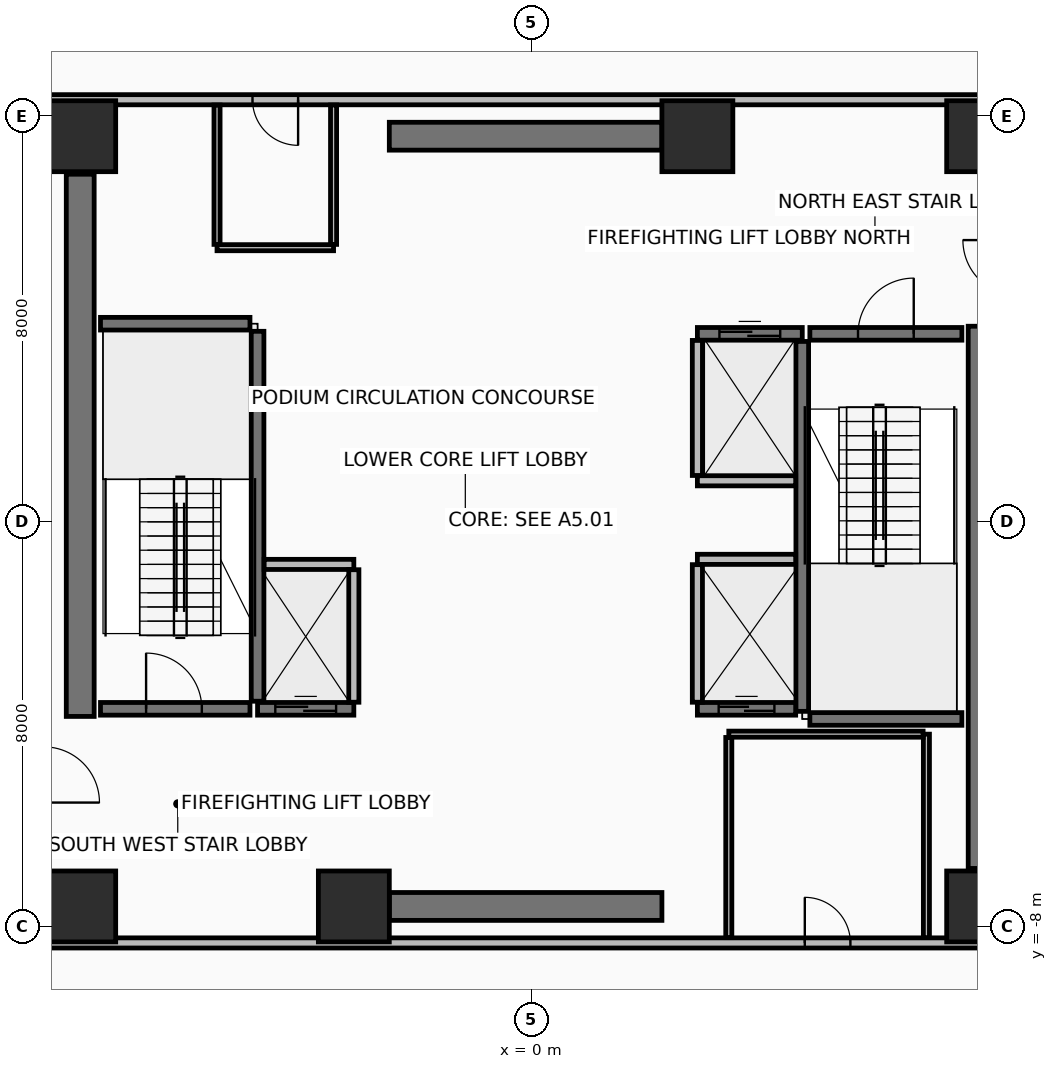
"""IFC4 building model, lengths in metres.
Left out: names, types, materials, properties, quantities, classifications, styles, units other than length and angle.
Written with IfcOpenShell. Run it as: python <this file> out.ifc"""

import sys

from ifc_helpers import new_model, si_unit, direction, frame, frame_2d, origin, origin_2d, place, context, subcontext, project, spatial, rectangle, extrude, element, fill, save


model = new_model("IFC4")
c1 = context("Model", 3, precision=1e-05, world=origin(), true_north=direction((0.0, 1.0)))
c2 = subcontext(c1, "Body", "Model", "MODEL_VIEW")
j1 = project(units=[si_unit("LENGTHUNIT", "METRE"), si_unit("PLANEANGLEUNIT", "RADIAN")], contexts=[c1])
p1 = place(None, origin())
s1 = spatial("IfcSite", under=j1, at=p1, CompositionType="ELEMENT")
p2 = place(p1, origin())
s2 = spatial("IfcBuilding", under=s1, at=p2, CompositionType="ELEMENT")
p3 = place(p2, frame((0.0, 0.0, -4.5)))
s3 = spatial("IfcBuildingStorey", under=s2, at=p3, CompositionType="ELEMENT", Elevation=-4.5)
for number, where, z_axis, x_axis in (
    (1, (-8.9, -7.6, 0.0), (0.0, 0.0, 1.0), (1.0, 0.0, 0.0)),
    (2, (-3.5, -7.6, 0.0), (0.0, 0.0, 1.0), (1.0, 0.0, 0.0)),
    (3, (8.9, -7.6, 0.0), (0.0, 0.0, 1.0), (1.0, 0.0, 0.0)),
    (4, (8.9, 7.6, 0.0), (0.0, 0.0, 1.0), (1.0, 0.0, 0.0)),
    (5, (3.28, 7.6, 0.0), (0.0, 0.0, 1.0), (1.0, 0.0, 0.0)),
    (6, (-8.9, 7.6, 0.0), (0.0, 0.0, 1.0), (1.0, 0.0, 0.0)),
):
    element("IfcColumn", number, at=place(p3, frame(where, z_axis=z_axis, x_axis=x_axis)), inside=s3, PredefinedType="COLUMN", context=c2, shape_type="SweptSolid", body=[
        extrude(rectangle(XDim=1.4, YDim=1.4, at=origin_2d()), origin(), (0.0, 0.0, 1.0), 4.5),
    ])
for number, where, z_axis, x_axis in (
    (7, (-2.8, -7.6, 0.0), (0.0, 0.0, 1.0), (1.0, 0.0, 0.0)),
    (8, (-2.8, 7.6, 0.0), (0.0, 0.0, 1.0), (1.0, 0.0, 0.0)),
):
    element("IfcWall", number, at=place(p3, frame(where, z_axis=z_axis, x_axis=x_axis)), inside=s3, PredefinedType="SHEAR", context=c2, shape_type="SweptSolid", body=[
        extrude(rectangle(XDim=5.38, YDim=0.55, at=frame_2d((2.69, 0.0))), origin(), (0.0, 0.0, 1.0), 4.2),
    ])
for number, where, z_axis, x_axis in (
    (9, (-8.9, -3.85, 0.0), (0.0, 0.0, 1.0), (0.0, 1.0, 0.0)),
    (10, (8.9, -6.85, 0.0), (0.0, 0.0, 1.0), (0.0, 1.0, 0.0)),
):
    element("IfcWall", number, at=place(p3, frame(where, z_axis=z_axis, x_axis=x_axis)), inside=s3, PredefinedType="SHEAR", context=c2, shape_type="SweptSolid", body=[
        extrude(rectangle(XDim=10.7, YDim=0.55, at=frame_2d((5.35, 0.0))), origin(), (0.0, 0.0, 1.0), 4.2),
    ])
p4 = place(p3, frame((-9.62, -8.32, 0.0), z_axis=(0.0, 0.0, 1.0), x_axis=(1.0, 0.0, 0.0)))
e11 = element("IfcWall", 11, at=p4, inside=s3, PredefinedType="PARTITIONING", context=c2, shape_type="SweptSolid", body=[
    extrude(rectangle(XDim=19.24, YDim=0.2, at=frame_2d((9.62, 0.0))), origin(), (0.0, 0.0, 1.0), 3.545),
])
p5 = place(p4, frame((15.02, 0.0, 0.0)))
e12 = element("IfcOpeningElement", 12, at=p5, cuts=e11, PredefinedType="OPENING", context=c2, shape_type="SweptSolid", body=[
    extrude(rectangle(XDim=0.9, YDim=2.1, at=frame_2d((0.45, 1.05))), frame((0.0, 0.11, 0.0), z_axis=(0.0, -1.0, 0.0), x_axis=(1.0, 0.0, 0.0)), (0.0, 0.0, 1.0), 0.22),
])
p6 = place(p3, frame((9.62, 8.32, 0.0), z_axis=(0.0, 0.0, 1.0), x_axis=(-1.0, 0.0, 0.0)))
e13 = element("IfcWall", 13, at=p6, inside=s3, PredefinedType="PARTITIONING", context=c2, shape_type="SweptSolid", body=[
    extrude(rectangle(XDim=19.24, YDim=0.2, at=frame_2d((9.62, 0.0))), origin(), (0.0, 0.0, 1.0), 3.545),
])
p7 = place(p6, frame((14.22, 0.0, 0.0)))
e14 = element("IfcOpeningElement", 14, at=p7, cuts=e13, PredefinedType="OPENING", context=c2, shape_type="SweptSolid", body=[
    extrude(rectangle(XDim=0.9, YDim=2.1, at=frame_2d((0.45, 1.05))), frame((0.0, 0.11, 0.0), z_axis=(0.0, -1.0, 0.0), x_axis=(1.0, 0.0, 0.0)), (0.0, 0.0, 1.0), 0.22),
])
p8 = place(p3, frame((-5.4, -3.55, 0.0), z_axis=(0.0, 0.0, 1.0), x_axis=(0.0, 1.0, 0.0)))
e15 = element("IfcWall", 15, at=p8, inside=s3, PredefinedType="SHEAR", context=c2, shape_type="SweptSolid", body=[
    extrude(rectangle(XDim=7.3, YDim=0.25, at=frame_2d((3.65, 0.0))), origin(), (0.0, 0.0, 1.0), 4.2),
])
p9 = place(p3, frame((-8.5, -3.7, 0.0), z_axis=(0.0, 0.0, 1.0), x_axis=(1.0, 0.0, 0.0)))
e16 = element("IfcWall", 16, at=p9, inside=s3, PredefinedType="SHEAR", context=c2, shape_type="SweptSolid", body=[
    extrude(rectangle(XDim=2.95, YDim=0.25, at=frame_2d((1.475, 0.0))), origin(), (0.0, 0.0, 1.0), 4.2),
])
p10 = place(p9, frame((0.9, 0.0, 0.0)))
e17 = element("IfcOpeningElement", 17, at=p10, cuts=e16, PredefinedType="OPENING", context=c2, shape_type="SweptSolid", body=[
    extrude(rectangle(XDim=1.1, YDim=2.15, at=frame_2d((0.55, 1.075))), frame((0.0, 0.135, 0.0), z_axis=(0.0, -1.0, 0.0), x_axis=(1.0, 0.0, 0.0)), (0.0, 0.0, 1.0), 0.27),
])
p11 = place(p3, frame((-8.5, 3.9, 0.0), z_axis=(0.0, 0.0, 1.0), x_axis=(1.0, 0.0, 0.0)))
e18 = element("IfcWall", 18, at=p11, inside=s3, PredefinedType="SHEAR", context=c2, shape_type="SweptSolid", body=[
    extrude(rectangle(XDim=2.95, YDim=0.25, at=frame_2d((1.475, 0.0))), origin(), (0.0, 0.0, 1.0), 4.2),
])
p12 = place(p3, frame((5.35, -3.75, 0.0), z_axis=(0.0, 0.0, 1.0), x_axis=(0.0, 1.0, 0.0)))
e19 = element("IfcWall", 19, at=p12, inside=s3, PredefinedType="SHEAR", context=c2, shape_type="SweptSolid", body=[
    extrude(rectangle(XDim=7.3, YDim=0.25, at=frame_2d((3.65, 0.0))), origin(), (0.0, 0.0, 1.0), 4.2),
])
p13 = place(p3, frame((5.5, 3.7, 0.0), z_axis=(0.0, 0.0, 1.0), x_axis=(1.0, 0.0, 0.0)))
e20 = element("IfcWall", 20, at=p13, inside=s3, PredefinedType="SHEAR", context=c2, shape_type="SweptSolid", body=[
    extrude(rectangle(XDim=3.0, YDim=0.25, at=frame_2d((1.5, 0.0))), origin(), (0.0, 0.0, 1.0), 4.2),
])
p14 = place(p13, frame((0.95, 0.0, 0.0)))
e21 = element("IfcOpeningElement", 21, at=p14, cuts=e20, PredefinedType="OPENING", context=c2, shape_type="SweptSolid", body=[
    extrude(rectangle(XDim=1.1, YDim=2.15, at=frame_2d((0.55, 1.075))), frame((0.0, 0.135, 0.0), z_axis=(0.0, -1.0, 0.0), x_axis=(1.0, 0.0, 0.0)), (0.0, 0.0, 1.0), 0.27),
])
p15 = place(p3, frame((5.5, -3.9, 0.0), z_axis=(0.0, 0.0, 1.0), x_axis=(1.0, 0.0, 0.0)))
e22 = element("IfcWall", 22, at=p15, inside=s3, PredefinedType="SHEAR", context=c2, shape_type="SweptSolid", body=[
    extrude(rectangle(XDim=3.0, YDim=0.25, at=frame_2d((1.5, 0.0))), origin(), (0.0, 0.0, 1.0), 4.2),
])
p16 = place(p3, frame((-5.4, -3.7, 0.0), z_axis=(0.0, 0.0, 1.0), x_axis=(1.0, 0.0, 0.0)))
e23 = element("IfcWall", 23, at=p16, inside=s3, PredefinedType="SHEAR", context=c2, shape_type="SweptSolid", body=[
    extrude(rectangle(XDim=1.9, YDim=0.25, at=frame_2d((0.95, 0.0))), origin(), (0.0, 0.0, 1.0), 4.2),
])
p17 = place(p16, frame((0.35, 0.0, 0.0)))
e24 = element("IfcOpeningElement", 24, at=p17, cuts=e23, PredefinedType="OPENING", context=c2, shape_type="SweptSolid", body=[
    extrude(rectangle(XDim=1.2, YDim=2.2, at=frame_2d((0.6, 1.1))), frame((0.0, 0.135, 0.0), z_axis=(0.0, -1.0, 0.0), x_axis=(1.0, 0.0, 0.0)), (0.0, 0.0, 1.0), 0.27),
])
p18 = place(p3, frame((-5.27, -0.85, 0.0), z_axis=(0.0, 0.0, 1.0), x_axis=(1.0, 0.0, 0.0)))
e25 = element("IfcWall", 25, at=p18, inside=s3, PredefinedType="PARTITIONING", context=c2, shape_type="SweptSolid", body=[
    extrude(rectangle(XDim=1.77, YDim=0.2, at=frame_2d((0.885, 0.0))), origin(), (0.0, 0.0, 1.0), 4.2),
])
p19 = place(p3, frame((-3.5, -3.57, 0.0), z_axis=(0.0, 0.0, 1.0), x_axis=(0.0, 1.0, 0.0)))
e26 = element("IfcWall", 26, at=p19, inside=s3, PredefinedType="PARTITIONING", context=c2, shape_type="SweptSolid", body=[
    extrude(rectangle(XDim=2.615, YDim=0.2, at=frame_2d((1.308, 0.0))), origin(), (0.0, 0.0, 1.0), 4.2),
])
p20 = place(p3, frame((3.28, 3.7, 0.0), z_axis=(0.0, 0.0, 1.0), x_axis=(1.0, 0.0, 0.0)))
e27 = element("IfcWall", 27, at=p20, inside=s3, PredefinedType="SHEAR", context=c2, shape_type="SweptSolid", body=[
    extrude(rectangle(XDim=2.07, YDim=0.25, at=frame_2d((1.035, 0.0))), origin(), (0.0, 0.0, 1.0), 4.2),
])
p21 = place(p20, frame((0.435, 0.0, 0.0)))
e28 = element("IfcOpeningElement", 28, at=p21, cuts=e27, PredefinedType="OPENING", context=c2, shape_type="SweptSolid", body=[
    extrude(rectangle(XDim=1.2, YDim=2.2, at=frame_2d((0.6, 1.1))), frame((0.0, 0.135, 0.0), z_axis=(0.0, -1.0, 0.0), x_axis=(1.0, 0.0, 0.0)), (0.0, 0.0, 1.0), 0.27),
])
p22 = place(p3, frame((3.28, 0.8, 0.0), z_axis=(0.0, 0.0, 1.0), x_axis=(1.0, 0.0, 0.0)))
e29 = element("IfcWall", 29, at=p22, inside=s3, PredefinedType="PARTITIONING", context=c2, shape_type="SweptSolid", body=[
    extrude(rectangle(XDim=1.94, YDim=0.2, at=frame_2d((0.97, 0.0))), origin(), (0.0, 0.0, 1.0), 4.2),
])
p23 = place(p3, frame((3.28, 0.905, 0.0), z_axis=(0.0, 0.0, 1.0), x_axis=(0.0, 1.0, 0.0)))
e30 = element("IfcWall", 30, at=p23, inside=s3, PredefinedType="PARTITIONING", context=c2, shape_type="SweptSolid", body=[
    extrude(rectangle(XDim=2.665, YDim=0.2, at=frame_2d((1.333, 0.0))), origin(), (0.0, 0.0, 1.0), 4.2),
])
p24 = place(p3, frame((3.28, -3.7, 0.0), z_axis=(0.0, 0.0, 1.0), x_axis=(1.0, 0.0, 0.0)))
e31 = element("IfcWall", 31, at=p24, inside=s3, PredefinedType="SHEAR", context=c2, shape_type="SweptSolid", body=[
    extrude(rectangle(XDim=1.94, YDim=0.25, at=frame_2d((0.97, 0.0))), origin(), (0.0, 0.0, 1.0), 4.2),
])
p25 = place(p24, frame((0.42, 0.0, 0.0)))
e32 = element("IfcOpeningElement", 32, at=p25, cuts=e31, PredefinedType="OPENING", context=c2, shape_type="SweptSolid", body=[
    extrude(rectangle(XDim=1.1, YDim=2.2, at=frame_2d((0.55, 1.1))), frame((0.0, 0.135, 0.0), z_axis=(0.0, -1.0, 0.0), x_axis=(1.0, 0.0, 0.0)), (0.0, 0.0, 1.0), 0.27),
])
p26 = place(p3, frame((3.28, -0.75, 0.0), z_axis=(0.0, 0.0, 1.0), x_axis=(1.0, 0.0, 0.0)))
e33 = element("IfcWall", 33, at=p26, inside=s3, PredefinedType="PARTITIONING", context=c2, shape_type="SweptSolid", body=[
    extrude(rectangle(XDim=1.94, YDim=0.2, at=frame_2d((0.97, 0.0))), origin(), (0.0, 0.0, 1.0), 4.2),
])
p27 = place(p3, frame((3.28, -3.57, 0.0), z_axis=(0.0, 0.0, 1.0), x_axis=(0.0, 1.0, 0.0)))
e34 = element("IfcWall", 34, at=p27, inside=s3, PredefinedType="PARTITIONING", context=c2, shape_type="SweptSolid", body=[
    extrude(rectangle(XDim=2.715, YDim=0.2, at=frame_2d((1.357, 0.0))), origin(), (0.0, 0.0, 1.0), 4.2),
])
p28 = place(p3, frame((-6.2, 5.4, 0.0), z_axis=(0.0, 0.0, 1.0), x_axis=(1.0, 0.0, 0.0)))
e35 = element("IfcWall", 35, at=p28, inside=s3, PredefinedType="PARTITIONING", context=c2, shape_type="SweptSolid", body=[
    extrude(rectangle(XDim=2.3, YDim=0.12, at=frame_2d((1.15, 0.0))), origin(), (0.0, 0.0, 1.0), 4.2),
])
for number, where, z_axis, x_axis in (
    (36, (-3.9, 5.465, 0.0), (0.0, 0.0, 1.0), (0.0, 1.0, 0.0)),
    (37, (-6.2, 8.215, 0.0), (0.0, 0.0, 1.0), (0.0, -1.0, 0.0)),
):
    element("IfcWall", number, at=place(p3, frame(where, z_axis=z_axis, x_axis=x_axis)), inside=s3, PredefinedType="PARTITIONING", context=c2, shape_type="SweptSolid", body=[
        extrude(rectangle(XDim=2.75, YDim=0.12, at=frame_2d((1.375, 0.0))), origin(), (0.0, 0.0, 1.0), 3.295),
    ])
p29 = place(p3, frame((7.8, -8.215, 0.0), z_axis=(0.0, 0.0, 1.0), x_axis=(0.0, 1.0, 0.0)))
e38 = element("IfcWall", 38, at=p29, inside=s3, PredefinedType="PARTITIONING", context=c2, shape_type="SweptSolid", body=[
    extrude(rectangle(XDim=4.015, YDim=0.12, at=frame_2d((2.008, 0.0))), origin(), (0.0, 0.0, 1.0), 3.295),
])
p30 = place(p3, frame((7.735, -4.2, 0.0), z_axis=(0.0, 0.0, 1.0), x_axis=(-1.0, 0.0, 0.0)))
e39 = element("IfcWall", 39, at=p30, inside=s3, PredefinedType="PARTITIONING", context=c2, shape_type="SweptSolid", body=[
    extrude(rectangle(XDim=3.835, YDim=0.12, at=frame_2d((1.917, 0.0))), origin(), (0.0, 0.0, 1.0), 4.2),
])
p31 = place(p3, frame((3.9, -4.265, 0.0), z_axis=(0.0, 0.0, 1.0), x_axis=(0.0, -1.0, 0.0)))
e40 = element("IfcWall", 40, at=p31, inside=s3, PredefinedType="PARTITIONING", context=c2, shape_type="SweptSolid", body=[
    extrude(rectangle(XDim=3.95, YDim=0.12, at=frame_2d((1.975, 0.0))), origin(), (0.0, 0.0, 1.0), 3.295),
])
p32 = place(p10, origin())
e41 = element("IfcDoor", 41, at=p32, inside=s3, OperationType="SINGLE_SWING_LEFT", PredefinedType="DOOR", context=c2, shape_type="SweptSolid", body=[
    extrude(rectangle(XDim=1.1, YDim=2.15, at=frame_2d((0.55, 1.075))), frame((0.0, 0.025, 0.0), z_axis=(0.0, -1.0, 0.0), x_axis=(1.0, 0.0, 0.0)), (0.0, 0.0, 1.0), 0.05),
])
fill(e17, e41)
p33 = place(p14, frame((1.1, 0.0, 0.0), z_axis=(0.0, 0.0, 1.0), x_axis=(-1.0, 0.0, 0.0)))
e42 = element("IfcDoor", 42, at=p33, inside=s3, OperationType="SINGLE_SWING_LEFT", PredefinedType="DOOR", context=c2, shape_type="SweptSolid", body=[
    extrude(rectangle(XDim=1.1, YDim=2.15, at=frame_2d((0.55, 1.075))), frame((0.0, 0.025, 0.0), z_axis=(0.0, -1.0, 0.0), x_axis=(1.0, 0.0, 0.0)), (0.0, 0.0, 1.0), 0.05),
])
fill(e21, e42)
p34 = place(p17, origin())
e43 = element("IfcDoor", 43, at=p34, inside=s3, OperationType="SLIDING_TO_RIGHT", PredefinedType="DOOR", context=c2, shape_type="SweptSolid", body=[
    extrude(rectangle(XDim=1.2, YDim=2.2, at=frame_2d((0.6, 1.1))), frame((0.0, 0.025, 0.0), z_axis=(0.0, -1.0, 0.0), x_axis=(1.0, 0.0, 0.0)), (0.0, 0.0, 1.0), 0.05),
])
fill(e24, e43)
p35 = place(p21, origin())
e44 = element("IfcDoor", 44, at=p35, inside=s3, OperationType="SLIDING_TO_RIGHT", PredefinedType="DOOR", context=c2, shape_type="SweptSolid", body=[
    extrude(rectangle(XDim=1.2, YDim=2.2, at=frame_2d((0.6, 1.1))), frame((0.0, 0.025, 0.0), z_axis=(0.0, -1.0, 0.0), x_axis=(1.0, 0.0, 0.0)), (0.0, 0.0, 1.0), 0.05),
])
fill(e28, e44)
p36 = place(p25, origin())
e45 = element("IfcDoor", 45, at=p36, inside=s3, OperationType="SLIDING_TO_LEFT", PredefinedType="DOOR", context=c2, shape_type="SweptSolid", body=[
    extrude(rectangle(XDim=1.1, YDim=2.2, at=frame_2d((0.55, 1.1))), frame((0.0, 0.025, 0.0), z_axis=(0.0, -1.0, 0.0), x_axis=(1.0, 0.0, 0.0)), (0.0, 0.0, 1.0), 0.05),
])
fill(e32, e45)
p37 = place(p7, origin())
e46 = element("IfcDoor", 46, at=p37, inside=s3, OperationType="SINGLE_SWING_LEFT", PredefinedType="DOOR", context=c2, shape_type="SweptSolid", body=[
    extrude(rectangle(XDim=0.9, YDim=2.1, at=frame_2d((0.45, 1.05))), frame((0.0, 0.025, 0.0), z_axis=(0.0, -1.0, 0.0), x_axis=(1.0, 0.0, 0.0)), (0.0, 0.0, 1.0), 0.05),
])
fill(e14, e46)
p38 = place(p5, origin())
e47 = element("IfcDoor", 47, at=p38, inside=s3, OperationType="SINGLE_SWING_LEFT", PredefinedType="DOOR", context=c2, shape_type="SweptSolid", body=[
    extrude(rectangle(XDim=0.9, YDim=2.1, at=frame_2d((0.45, 1.05))), frame((0.0, 0.025, 0.0), z_axis=(0.0, -1.0, 0.0), x_axis=(1.0, 0.0, 0.0)), (0.0, 0.0, 1.0), 0.05),
])
fill(e12, e47)
save(model, sys.argv[1])
